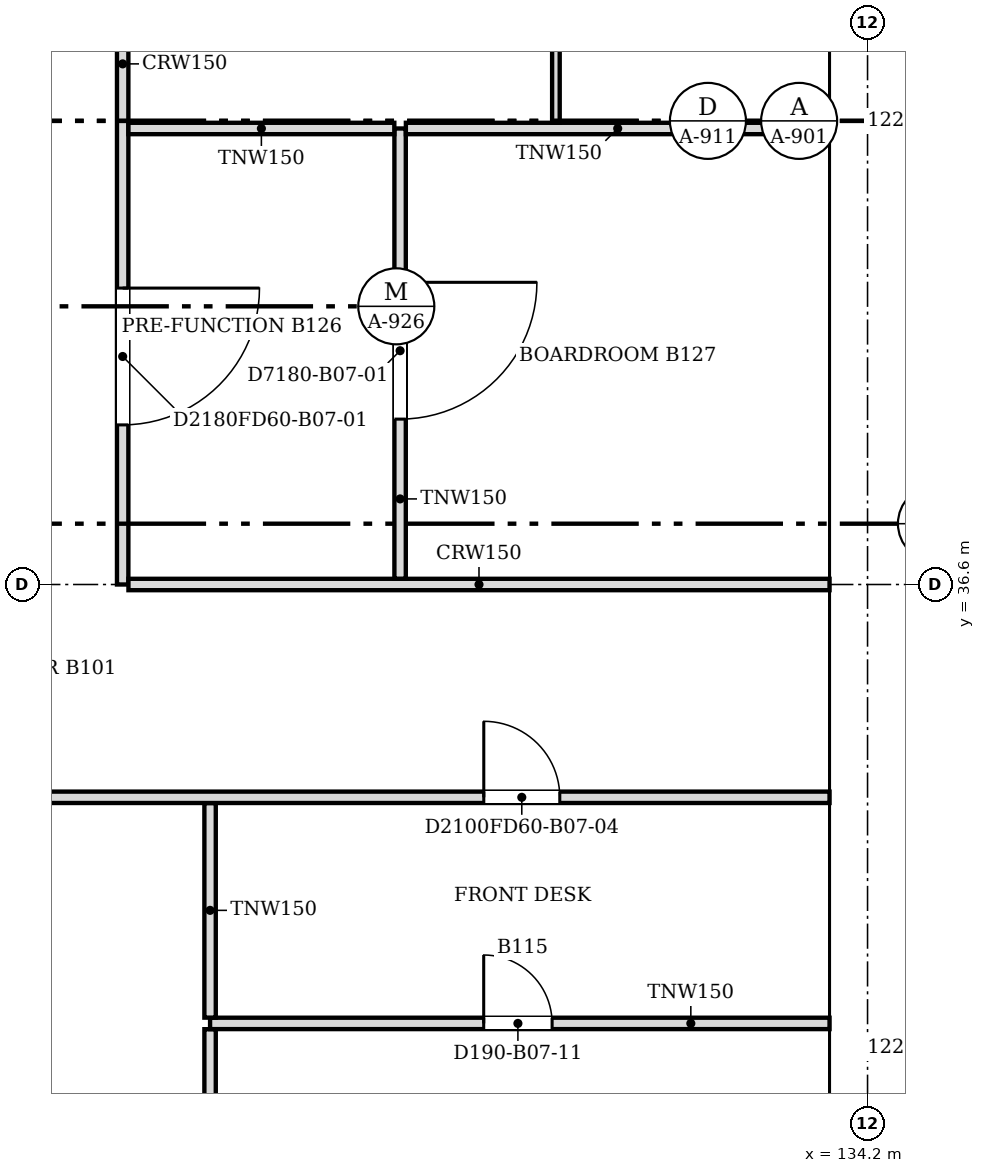
"""IFC4 building model, lengths in metres.
Left out: names, types, materials, properties, quantities, classifications, styles, units other than length and angle.
Written with IfcOpenShell. Run it as: python <this file> out.ifc"""

import sys

from ifc_helpers import new_model, si_unit, direction, frame, frame_2d, origin, place, context, subcontext, project, spatial, polyline, rectangle, outline, extrude, faceted_brep, source, transform, mapped, element, fill, save


model = new_model("IFC4")
c1 = context("Model", 3, precision=1e-05, world=origin(), true_north=direction((0.0, 1.0)))
c2 = subcontext(c1, "Body", "Model", "MODEL_VIEW")
j1 = project(units=[si_unit("LENGTHUNIT", "METRE"), si_unit("PLANEANGLEUNIT", "RADIAN")], contexts=[c1])
p1 = place(None, origin())
s1 = spatial("IfcSite", under=j1, at=p1, CompositionType="ELEMENT")
p2 = place(p1, origin())
s2 = spatial("IfcBuilding", under=s1, at=p2, CompositionType="ELEMENT")
p3 = place(p2, frame((0.0, 0.0, 68.6)))
s3 = spatial("IfcBuildingStorey", under=s2, at=p3, CompositionType="ELEMENT", Elevation=68.6)
m1 = source(origin(), c2, "Body", "Brep", [
    faceted_brep([(6.053, -0.25, 0.0), (3.003, -0.25, 3.8), (0.0, -0.25, 0.0), (0.047, 0.25, 0.059), (3.003, 0.25, 3.8), (6.053, 0.25, 0.0), (0.047, 0.25, 0.0), (0.0, 0.0, 0.0)], [[[0, 1, 2]], [[3, 4, 5, 6]], [[5, 4, 1, 0]], [[4, 3, 7, 2, 1]], [[6, 5, 0, 2, 7]], [[6, 7, 3]]]),
])
p4 = place(p3, frame((133.95, 24.447, 0.0), z_axis=(0.0, 0.0, 1.0), x_axis=(0.0, 1.0, 0.0)))
e1 = element("IfcWall", 1, at=p4, inside=s3, PredefinedType="SOLIDWALL", context=c2, shape_type="MappedRepresentation", body=[
    mapped(m1, transform((0.0, 0.0, 0.0), scale=1.0)),
])
m2 = source(origin(), c2, "Body", "SweptSolid", [
    extrude(outline(polyline([(5.532, 0.25), (3.005, 3.399), (0.516, 0.25), (5.532, 0.25)])), frame((0.0, 0.26, 0.0), z_axis=(0.0, -1.0, 0.0), x_axis=(1.0, 0.0, 0.0)), (0.0, 0.0, 1.0), 0.52),
])
p5 = place(p4, origin())
e2 = element("IfcOpeningElement", 2, at=p5, cuts=e1, PredefinedType="OPENING", context=c2, shape_type="MappedRepresentation", body=[
    mapped(m2, transform((0.0, 0.0, 0.0), scale=1.0)),
])
m3 = source(origin(), c2, "Body", "SweptSolid", [
    extrude(outline(polyline([(6.1, 0.0), (3.05, 3.8), (0.0, 0.0), (6.1, 0.0)])), frame((0.0, 0.25, 0.0), z_axis=(0.0, -1.0, 0.0), x_axis=(1.0, 0.0, 0.0)), (0.0, 0.0, 1.0), 0.5),
])
p6 = place(p3, frame((133.95, 30.5, 0.0), z_axis=(0.0, 0.0, 1.0), x_axis=(0.0, 1.0, 0.0)))
e3 = element("IfcWall", 3, at=p6, inside=s3, PredefinedType="SOLIDWALL", context=c2, shape_type="MappedRepresentation", body=[
    mapped(m3, transform((0.0, 0.0, 0.0), scale=1.0)),
])
m4 = source(origin(), c2, "Body", "SweptSolid", [
    extrude(outline(polyline([(5.579, 0.25), (3.05, 3.4), (0.521, 0.25), (5.579, 0.25)])), frame((0.0, 0.26, 0.0), z_axis=(0.0, -1.0, 0.0), x_axis=(1.0, 0.0, 0.0)), (0.0, 0.0, 1.0), 0.52),
])
p7 = place(p6, origin())
e4 = element("IfcOpeningElement", 4, at=p7, cuts=e3, PredefinedType="OPENING", context=c2, shape_type="MappedRepresentation", body=[
    mapped(m4, transform((0.0, 0.0, 0.0), scale=1.0)),
])
m5 = source(origin(), c2, "Body", "Brep", [
    faceted_brep([(6.1, -0.25, 0.0), (3.05, -0.25, 3.8), (0.0, -0.25, 0.0), (6.1, -0.25, 0.0), (0.0, 0.25, 0.0), (3.05, 0.25, 3.8), (6.1, 0.25, 0.0), (6.1, 0.25, 0.0)], [[[0, 1, 2, 3]], [[4, 5, 6, 7]], [[6, 5, 1, 0]], [[5, 4, 2, 1]], [[4, 7, 3, 2]], [[3, 7, 6, 0]]]),
])
p8 = place(p3, frame((133.95, 36.6, 0.0), z_axis=(0.0, 0.0, 1.0), x_axis=(0.0, 1.0, 0.0)))
e5 = element("IfcWall", 5, at=p8, inside=s3, PredefinedType="SOLIDWALL", context=c2, shape_type="MappedRepresentation", body=[
    mapped(m5, transform((0.0, 0.0, 0.0), scale=1.0)),
])
p9 = place(p8, origin())
e6 = element("IfcOpeningElement", 6, at=p9, cuts=e5, PredefinedType="OPENING", context=c2, shape_type="MappedRepresentation", body=[
    mapped(m4, transform((0.0, 0.0, 0.0), scale=1.0)),
])
m6 = source(origin(), c2, "Body", "Brep", [
    faceted_brep([(6.053, -0.25, 0.0), (3.05, -0.25, 3.8), (0.0, -0.25, 0.0), (0.0, 0.25, 0.0), (3.05, 0.25, 3.8), (6.007, 0.25, 0.059), (6.007, 0.25, 0.0), (6.053, 0.0, 0.0)], [[[0, 1, 2]], [[3, 4, 5, 6]], [[5, 4, 1, 0, 7]], [[4, 3, 2, 1]], [[3, 6, 7, 0, 2]], [[7, 6, 5]]]),
])
p10 = place(p3, frame((133.95, 42.7, 0.0), z_axis=(0.0, 0.0, 1.0), x_axis=(0.0, 1.0, 0.0)))
e7 = element("IfcWall", 7, at=p10, inside=s3, PredefinedType="SOLIDWALL", context=c2, shape_type="MappedRepresentation", body=[
    mapped(m6, transform((0.0, 0.0, 0.0), scale=1.0)),
])
m7 = source(origin(), c2, "Body", "SweptSolid", [
    extrude(outline(polyline([(5.537, 0.25), (3.049, 3.399), (0.521, 0.25), (5.537, 0.25)])), frame((0.0, 0.26, 0.0), z_axis=(0.0, -1.0, 0.0), x_axis=(1.0, 0.0, 0.0)), (0.0, 0.0, 1.0), 0.52),
])
p11 = place(p10, origin())
e8 = element("IfcOpeningElement", 8, at=p11, cuts=e7, PredefinedType="OPENING", context=c2, shape_type="MappedRepresentation", body=[
    mapped(m7, transform((0.0, 0.0, 0.0), scale=1.0)),
])
p12 = place(p2, frame((0.0, 0.0, 72.4)))
s4 = spatial("IfcBuildingStorey", under=s2, at=p12, CompositionType="ELEMENT", Elevation=72.4)
m8 = source(origin(), c2, "Body", "SweptSolid", [
    extrude(outline(polyline([(3.05, 0.0), (6.1, 3.8), (3.05, 7.6), (0.0, 3.8), (3.05, 0.0)])), frame((0.0, 0.25, 0.0), z_axis=(0.0, -1.0, 0.0), x_axis=(1.0, 0.0, 0.0)), (0.0, 0.0, 1.0), 0.5),
])
p13 = place(p12, frame((133.95, 27.45, -3.8), z_axis=(0.0, 0.0, 1.0), x_axis=(0.0, 1.0, 0.0)))
e9 = element("IfcWall", 9, at=p13, inside=s4, PredefinedType="SOLIDWALL", context=c2, shape_type="MappedRepresentation", body=[
    mapped(m8, transform((0.0, 0.0, 0.0), scale=1.0)),
])
m9 = source(origin(), c2, "Body", "SweptSolid", [
    extrude(outline(polyline([(3.05, 0.399), (5.78, 3.8), (3.05, 7.2), (0.321, 3.8), (3.05, 0.399)])), frame((0.0, 0.26, 0.0), z_axis=(0.0, -1.0, 0.0), x_axis=(1.0, 0.0, 0.0)), (0.0, 0.0, 1.0), 0.52),
])
p14 = place(p13, origin())
e10 = element("IfcOpeningElement", 10, at=p14, cuts=e9, PredefinedType="OPENING", context=c2, shape_type="MappedRepresentation", body=[
    mapped(m9, transform((0.0, 0.0, 0.0), scale=1.0)),
])
m10 = source(origin(), c2, "Body", "Brep", [
    faceted_brep([(3.05, -0.25, 0.0), (6.1, -0.25, 3.8), (6.1, -0.25, 3.8), (3.05, -0.25, 7.6), (0.0, -0.25, 3.8), (0.0, 0.25, 3.8), (3.05, 0.25, 7.6), (6.1, 0.25, 3.8), (6.1, 0.25, 3.8), (3.05, 0.25, 0.0)], [[[0, 1, 2, 3, 4]], [[5, 6, 7, 8, 9]], [[9, 8, 1, 0]], [[7, 6, 3, 2]], [[6, 5, 4, 3]], [[5, 9, 0, 4]], [[1, 8, 7, 2]]]),
])
p15 = place(p12, frame((133.95, 33.55, -3.8), z_axis=(0.0, 0.0, 1.0), x_axis=(0.0, 1.0, 0.0)))
e11 = element("IfcWall", 11, at=p15, inside=s4, PredefinedType="SOLIDWALL", context=c2, shape_type="MappedRepresentation", body=[
    mapped(m10, transform((0.0, 0.0, 0.0), scale=1.0)),
])
p16 = place(p15, origin())
e12 = element("IfcOpeningElement", 12, at=p16, cuts=e11, PredefinedType="OPENING", context=c2, shape_type="MappedRepresentation", body=[
    mapped(m9, transform((0.0, 0.0, 0.0), scale=1.0)),
])
p17 = place(p12, frame((133.95, 39.65, -3.8), z_axis=(0.0, 0.0, 1.0), x_axis=(0.0, 1.0, 0.0)))
e13 = element("IfcWall", 13, at=p17, inside=s4, PredefinedType="SOLIDWALL", context=c2, shape_type="MappedRepresentation", body=[
    mapped(m8, transform((0.0, 0.0, 0.0), scale=1.0)),
])
p18 = place(p17, origin())
e14 = element("IfcOpeningElement", 14, at=p18, cuts=e13, PredefinedType="OPENING", context=c2, shape_type="MappedRepresentation", body=[
    mapped(m9, transform((0.0, 0.0, 0.0), scale=1.0)),
])
p19 = place(p3, frame((125.55, 22.926, 0.0), z_axis=(0.0, 0.0, 1.0), x_axis=(0.0, 1.0, 0.0)))
e15 = element("IfcWall", 15, at=p19, inside=s3, PredefinedType="PARTITIONING", context=c2, shape_type="SweptSolid", body=[
    extrude(rectangle(XDim=7.823, YDim=0.15, at=frame_2d((3.912, 0.0))), origin(), (0.0, 0.0, 1.0), 3.067),
])
p20 = place(p3, frame((133.7, 30.825, 0.0), z_axis=(0.0, 0.0, 1.0), x_axis=(-1.0, 0.0, 0.0)))
e16 = element("IfcWall", 16, at=p20, inside=s3, PredefinedType="PARTITIONING", context=c2, shape_type="SweptSolid", body=[
    extrude(rectangle(XDim=8.15, YDim=0.15, at=frame_2d((4.075, 0.0))), origin(), (0.0, 0.0, 1.0), 3.067),
])
m11 = source(origin(), c2, "Body", "SweptSolid", [
    extrude(rectangle(XDim=0.9, YDim=2.1, at=frame_2d((0.45, 1.05))), frame((0.0, 0.085, 0.0), z_axis=(0.0, -1.0, 0.0), x_axis=(1.0, 0.0, 0.0)), (0.0, 0.0, 1.0), 0.17),
])
p21 = place(p20, frame((3.65, 0.0, 0.0)))
e17 = element("IfcOpeningElement", 17, at=p21, cuts=e16, PredefinedType="OPENING", context=c2, shape_type="MappedRepresentation", body=[
    mapped(m11, transform((0.0, 0.0, 0.0), scale=1.0)),
])
p22 = place(p3, frame((125.55, 30.901, 0.0), z_axis=(0.0, 0.0, 1.0), x_axis=(0.0, 1.0, 0.0)))
e18 = element("IfcWall", 18, at=p22, inside=s3, PredefinedType="PARTITIONING", context=c2, shape_type="SweptSolid", body=[
    extrude(rectangle(XDim=2.823, YDim=0.15, at=frame_2d((1.412, 0.0))), origin(), (0.0, 0.0, 1.0), 3.067),
])
p23 = place(p3, frame((133.7, 33.8, 0.0), z_axis=(0.0, 0.0, 1.0), x_axis=(-1.0, 0.0, 0.0)))
e19 = element("IfcWall", 19, at=p23, inside=s3, PredefinedType="PARTITIONING", context=c2, shape_type="SweptSolid", body=[
    extrude(rectangle(XDim=47.8, YDim=0.15, at=frame_2d((23.9, 0.0))), origin(), (0.0, 0.0, 1.0), 3.067),
])
m12 = source(origin(), c2, "Body", "SweptSolid", [
    extrude(rectangle(XDim=1.0, YDim=2.1, at=frame_2d((0.5, 1.05))), frame((0.0, 0.085, 0.0), z_axis=(0.0, -1.0, 0.0), x_axis=(1.0, 0.0, 0.0)), (0.0, 0.0, 1.0), 0.17),
])
p24 = place(p23, frame((3.549, 0.0, 0.0)))
e20 = element("IfcOpeningElement", 20, at=p24, cuts=e19, PredefinedType="OPENING", context=c2, shape_type="MappedRepresentation", body=[
    mapped(m12, transform((0.0, 0.0, 0.0), scale=1.0)),
])
p25 = place(p23, frame((42.7, 0.0, 0.0)))
e21 = element("IfcOpeningElement", 21, at=p25, cuts=e19, PredefinedType="OPENING", context=c2, shape_type="MappedRepresentation", body=[
    mapped(m12, transform((0.0, 0.0, 0.0), scale=1.0)),
])
p26 = place(p23, frame((12.199, 0.0, 0.0)))
e22 = element("IfcOpeningElement", 22, at=p26, cuts=e19, PredefinedType="OPENING", context=c2, shape_type="MappedRepresentation", body=[
    mapped(m12, transform((0.0, 0.0, 0.0), scale=1.0)),
])
p27 = place(p23, frame((21.349, 0.0, 0.0)))
e23 = element("IfcOpeningElement", 23, at=p27, cuts=e19, PredefinedType="OPENING", context=c2, shape_type="MappedRepresentation", body=[
    mapped(m12, transform((0.0, 0.0, 0.0), scale=1.0)),
])
p28 = place(p23, frame((32.05, 0.0, 0.0)))
e24 = element("IfcOpeningElement", 24, at=p28, cuts=e19, PredefinedType="OPENING", context=c2, shape_type="MappedRepresentation", body=[
    mapped(m12, transform((0.0, 0.0, 0.0), scale=1.0)),
])
p29 = place(p3, frame((124.4, 51.2, 0.0), z_axis=(0.0, 0.0, 1.0), x_axis=(0.0, -1.0, 0.0)))
e25 = element("IfcWall", 25, at=p29, inside=s3, PredefinedType="PARTITIONING", context=c2, shape_type="SweptSolid", body=[
    extrude(rectangle(XDim=14.6, YDim=0.15, at=frame_2d((7.3, 0.0))), origin(), (0.0, 0.0, 1.0), 3.067),
])
p30 = place(p29, frame((3.9, 0.0, 0.0)))
e26 = element("IfcOpeningElement", 26, at=p30, cuts=e25, PredefinedType="OPENING", context=c2, shape_type="MappedRepresentation", body=[
    mapped(m11, transform((0.0, 0.0, 0.0), scale=1.0)),
])
m13 = source(origin(), c2, "Body", "SweptSolid", [
    extrude(rectangle(XDim=1.8, YDim=2.1, at=frame_2d((0.9, 1.05))), frame((0.0, 0.085, 0.0), z_axis=(0.0, -1.0, 0.0), x_axis=(1.0, 0.0, 0.0)), (0.0, 0.0, 1.0), 0.17),
])
p31 = place(p29, frame((10.7, 0.0, 0.0)))
e27 = element("IfcOpeningElement", 27, at=p31, cuts=e25, PredefinedType="OPENING", context=c2, shape_type="MappedRepresentation", body=[
    mapped(m13, transform((0.0, 0.0, 0.0), scale=1.0)),
])
p32 = place(p3, frame((124.476, 36.6, 0.0), z_axis=(0.0, 0.0, 1.0), x_axis=(1.0, 0.0, 0.0)))
e28 = element("IfcWall", 28, at=p32, inside=s3, PredefinedType="PARTITIONING", context=c2, shape_type="SweptSolid", body=[
    extrude(rectangle(XDim=9.224, YDim=0.15, at=frame_2d((4.612, 0.0))), origin(), (0.0, 0.0, 1.0), 3.067),
])
p33 = place(p3, frame((128.05, 42.6, 0.0), z_axis=(0.0, 0.0, 1.0), x_axis=(0.0, -1.0, 0.0)))
e29 = element("IfcWall", 29, at=p33, inside=s3, PredefinedType="PARTITIONING", context=c2, shape_type="SweptSolid", body=[
    extrude(rectangle(XDim=5.924, YDim=0.15, at=frame_2d((2.962, 0.0))), origin(), (0.0, 0.0, 1.0), 3.067),
])
p34 = place(p33, frame((2.024, 0.0, 0.0)))
e30 = element("IfcOpeningElement", 30, at=p34, cuts=e29, PredefinedType="OPENING", context=c2, shape_type="MappedRepresentation", body=[
    mapped(m13, transform((0.0, 0.0, 0.0), scale=1.0)),
])
p35 = place(p3, frame((124.476, 42.6, 0.0), z_axis=(0.0, 0.0, 1.0), x_axis=(1.0, 0.0, 0.0)))
e31 = element("IfcWall", 31, at=p35, inside=s3, PredefinedType="PARTITIONING", context=c2, shape_type="SweptSolid", body=[
    extrude(rectangle(XDim=3.498, YDim=0.15, at=frame_2d((1.749, 0.0))), origin(), (0.0, 0.0, 1.0), 3.067),
])
p36 = place(p3, frame((128.126, 42.6, 0.0), z_axis=(0.0, 0.0, 1.0), x_axis=(1.0, 0.0, 0.0)))
e32 = element("IfcWall", 32, at=p36, inside=s3, PredefinedType="PARTITIONING", context=c2, shape_type="SweptSolid", body=[
    extrude(rectangle(XDim=5.574, YDim=0.15, at=frame_2d((2.787, 0.0))), origin(), (0.0, 0.0, 1.0), 3.067),
])
p37 = place(p3, frame((130.1, 51.2, 0.0), z_axis=(0.0, 0.0, 1.0), x_axis=(0.0, -1.0, 0.0)))
e33 = element("IfcWall", 33, at=p37, inside=s3, PredefinedType="PARTITIONING", context=c2, shape_type="SweptSolid", body=[
    extrude(rectangle(XDim=8.524, YDim=0.1, at=frame_2d((4.262, 0.0))), origin(), (0.0, 0.0, 1.0), 3.067),
])
m14 = source(origin(), c2, "Body", "SweptSolid", [
    extrude(rectangle(XDim=0.9, YDim=2.1, at=frame_2d((0.45, 1.05))), frame((0.0, 0.06, 0.0), z_axis=(0.0, -1.0, 0.0), x_axis=(1.0, 0.0, 0.0)), (0.0, 0.0, 1.0), 0.12),
])
p38 = place(p37, frame((3.824, 0.0, 0.0)))
e34 = element("IfcOpeningElement", 34, at=p38, cuts=e33, PredefinedType="OPENING", context=c2, shape_type="MappedRepresentation", body=[
    mapped(m14, transform((0.0, 0.0, 0.0), scale=1.0)),
])
m15 = source(origin(), c2, "Body", "SweptSolid", [
    extrude(rectangle(XDim=1.8, YDim=2.1, at=frame_2d((0.9, 1.05))), frame((0.0, 0.025, 0.0), z_axis=(0.0, -1.0, 0.0), x_axis=(1.0, 0.0, 0.0)), (0.0, 0.0, 1.0), 0.05),
])
p39 = place(p34, origin())
e35 = element("IfcDoor", 35, at=p39, inside=s3, OperationType="DOUBLE_DOOR_SINGLE_SWING", PredefinedType="DOOR", context=c2, shape_type="MappedRepresentation", body=[
    mapped(m15, transform((0.0, 0.0, 0.0), scale=1.0)),
])
fill(e30, e35)
m16 = source(origin(), c2, "Body", "SweptSolid", [
    extrude(rectangle(XDim=1.0, YDim=2.1, at=frame_2d((0.5, 1.05))), frame((0.0, 0.025, 0.0), z_axis=(0.0, -1.0, 0.0), x_axis=(1.0, 0.0, 0.0)), (0.0, 0.0, 1.0), 0.05),
])
p40 = place(p24, origin())
e36 = element("IfcDoor", 36, at=p40, inside=s3, OperationType="SINGLE_SWING_RIGHT", PredefinedType="DOOR", context=c2, shape_type="MappedRepresentation", body=[
    mapped(m16, transform((0.0, 0.0, 0.0), scale=1.0)),
])
fill(e20, e36)
m17 = source(origin(), c2, "Body", "SweptSolid", [
    extrude(rectangle(XDim=0.9, YDim=2.1, at=frame_2d((0.45, 1.05))), frame((0.0, 0.025, 0.0), z_axis=(0.0, -1.0, 0.0), x_axis=(1.0, 0.0, 0.0)), (0.0, 0.0, 1.0), 0.05),
])
p41 = place(p21, origin())
e37 = element("IfcDoor", 37, at=p41, inside=s3, OperationType="SINGLE_SWING_RIGHT", PredefinedType="DOOR", context=c2, shape_type="MappedRepresentation", body=[
    mapped(m17, transform((0.0, 0.0, 0.0), scale=1.0)),
])
fill(e17, e37)
p42 = place(p31, origin())
e38 = element("IfcDoor", 38, at=p42, inside=s3, OperationType="DOUBLE_DOOR_SINGLE_SWING", PredefinedType="DOOR", context=c2, shape_type="MappedRepresentation", body=[
    mapped(m15, transform((0.0, 0.0, 0.0), scale=1.0)),
])
fill(e27, e38)
save(model, sys.argv[1])
